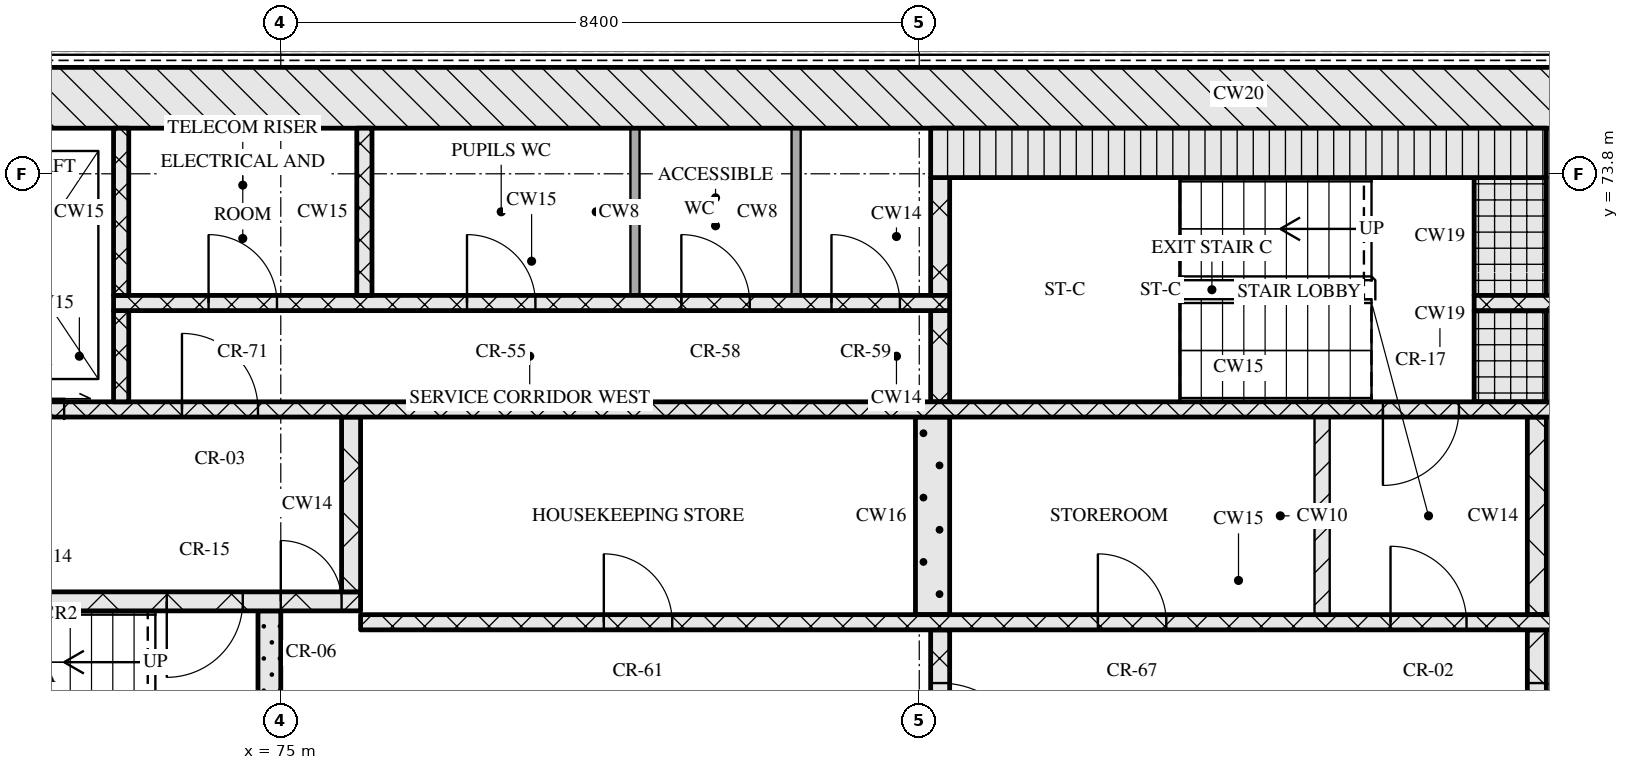
"""IFC4 building model, lengths in metres.
Left out: names, types, materials, properties, quantities, classifications, styles, units other than length and angle.
Written with IfcOpenShell. Run it as: python <this file> out.ifc"""

import sys

from ifc_helpers import new_model, si_unit, direction, frame, frame_2d, origin, place, context, subcontext, project, spatial, rectangle, extrude, element, fill, save


model = new_model("IFC4")
c1 = context("Model", 3, precision=1e-05, world=origin(), true_north=direction((0.0, 1.0)))
c2 = subcontext(c1, "Body", "Model", "MODEL_VIEW")
j1 = project(units=[si_unit("LENGTHUNIT", "METRE"), si_unit("PLANEANGLEUNIT", "RADIAN")], contexts=[c1])
p1 = place(None, origin())
s1 = spatial("IfcSite", under=j1, at=p1, CompositionType="ELEMENT")
p2 = place(p1, origin())
s2 = spatial("IfcBuilding", under=s1, at=p2, CompositionType="ELEMENT")
p3 = place(p2, frame((0.0, 0.0, 165.45)))
s3 = spatial("IfcBuildingStorey", under=s2, at=p3, CompositionType="ELEMENT", Elevation=165.45)
p4 = place(p3, frame((67.0, 74.8, 0.0), z_axis=(0.0, 0.0, 1.0), x_axis=(1.0, 0.0, 0.0)))
e1 = element("IfcWall", 1, at=p4, inside=s3, PredefinedType="SOLIDWALL", context=c2, shape_type="SweptSolid", body=[
    extrude(rectangle(XDim=41.2, YDim=0.8, at=frame_2d((20.6, 0.0))), origin(), (0.0, 0.0, 1.0), 3.32),
])
p5 = place(p3, frame((74.85, 65.2, 0.0), z_axis=(0.0, 0.0, 1.0), x_axis=(0.0, 1.0, 0.0)))
e2 = element("IfcWall", 2, at=p5, inside=s3, PredefinedType="SOLIDWALL", context=c2, shape_type="SweptSolid", body=[
    extrude(rectangle(XDim=2.85, YDim=0.3, at=frame_2d((1.425, 0.0))), origin(), (0.0, 0.0, 1.0), 3.32),
])
p6 = place(p3, frame((83.675, 65.2, 0.0), z_axis=(0.0, 0.0, 1.0), x_axis=(0.0, 1.0, 0.0)))
e3 = element("IfcWall", 3, at=p6, inside=s3, PredefinedType="SOLIDWALL", context=c2, shape_type="SweptSolid", body=[
    extrude(rectangle(XDim=2.6, YDim=0.25, at=frame_2d((1.3, 0.0))), origin(), (0.0, 0.0, 1.0), 3.32),
])
p7 = place(p6, frame((0.7, 0.0, 0.0)))
e4 = element("IfcOpeningElement", 4, at=p7, cuts=e3, PredefinedType="OPENING", context=c2, shape_type="SweptSolid", body=[
    extrude(rectangle(XDim=1.2, YDim=2.1, at=frame_2d((0.6, 1.05))), frame((0.0, 0.135, 0.0), z_axis=(0.0, -1.0, 0.0), x_axis=(1.0, 0.0, 0.0)), (0.0, 0.0, 1.0), 0.27),
])
p8 = place(p3, frame((91.525, 65.2, 0.0), z_axis=(0.0, 0.0, 1.0), x_axis=(0.0, 1.0, 0.0)))
e5 = element("IfcWall", 5, at=p8, inside=s3, PredefinedType="SOLIDWALL", context=c2, shape_type="SweptSolid", body=[
    extrude(rectangle(XDim=2.6, YDim=0.25, at=frame_2d((1.3, 0.0))), origin(), (0.0, 0.0, 1.0), 3.32),
])
p9 = place(p8, frame((0.7, 0.0, 0.0)))
e6 = element("IfcOpeningElement", 6, at=p9, cuts=e5, PredefinedType="OPENING", context=c2, shape_type="SweptSolid", body=[
    extrude(rectangle(XDim=1.2, YDim=2.1, at=frame_2d((0.6, 1.05))), frame((0.0, 0.135, 0.0), z_axis=(0.0, -1.0, 0.0), x_axis=(1.0, 0.0, 0.0)), (0.0, 0.0, 1.0), 0.27),
])
p10 = place(p3, frame((76.05, 67.9, 0.0), z_axis=(0.0, 0.0, 1.0), x_axis=(1.0, 0.0, 0.0)))
e7 = element("IfcWall", 7, at=p10, inside=s3, PredefinedType="SOLIDWALL", context=c2, shape_type="SweptSolid", body=[
    extrude(rectangle(XDim=23.1, YDim=0.2, at=frame_2d((11.55, 0.0))), origin(), (0.0, 0.0, 1.0), 3.32),
])
p11 = place(p10, frame((3.2, 0.0, 0.0)))
e8 = element("IfcOpeningElement", 8, at=p11, cuts=e7, PredefinedType="OPENING", context=c2, shape_type="SweptSolid", body=[
    extrude(rectangle(XDim=0.9, YDim=2.1, at=frame_2d((0.45, 1.05))), frame((0.0, 0.11, 0.0), z_axis=(0.0, -1.0, 0.0), x_axis=(1.0, 0.0, 0.0)), (0.0, 0.0, 1.0), 0.22),
])
p12 = place(p10, frame((9.7, 0.0, 0.0)))
e9 = element("IfcOpeningElement", 9, at=p12, cuts=e7, PredefinedType="OPENING", context=c2, shape_type="SweptSolid", body=[
    extrude(rectangle(XDim=0.9, YDim=2.1, at=frame_2d((0.45, 1.05))), frame((0.0, 0.11, 0.0), z_axis=(0.0, -1.0, 0.0), x_axis=(1.0, 0.0, 0.0)), (0.0, 0.0, 1.0), 0.22),
])
p13 = place(p10, frame((13.55, 0.0, 0.0)))
e10 = element("IfcOpeningElement", 10, at=p13, cuts=e7, PredefinedType="OPENING", context=c2, shape_type="SweptSolid", body=[
    extrude(rectangle(XDim=1.0, YDim=2.1, at=frame_2d((0.5, 1.05))), frame((0.0, 0.11, 0.0), z_axis=(0.0, -1.0, 0.0), x_axis=(1.0, 0.0, 0.0)), (0.0, 0.0, 1.0), 0.22),
])
p14 = place(p10, frame((16.2, 0.0, 0.0)))
e11 = element("IfcOpeningElement", 11, at=p14, cuts=e7, PredefinedType="OPENING", context=c2, shape_type="SweptSolid", body=[
    extrude(rectangle(XDim=1.1, YDim=2.1, at=frame_2d((0.55, 1.05))), frame((0.0, 0.11, 0.0), z_axis=(0.0, -1.0, 0.0), x_axis=(1.0, 0.0, 0.0)), (0.0, 0.0, 1.0), 0.22),
])
p15 = place(p10, frame((18.7, 0.0, 0.0)))
e12 = element("IfcOpeningElement", 12, at=p15, cuts=e7, PredefinedType="OPENING", context=c2, shape_type="SweptSolid", body=[
    extrude(rectangle(XDim=1.1, YDim=2.1, at=frame_2d((0.55, 1.05))), frame((0.0, 0.11, 0.0), z_axis=(0.0, -1.0, 0.0), x_axis=(1.0, 0.0, 0.0)), (0.0, 0.0, 1.0), 0.22),
])
p16 = place(p10, frame((21.2, 0.0, 0.0)))
e13 = element("IfcOpeningElement", 13, at=p16, cuts=e7, PredefinedType="OPENING", context=c2, shape_type="SweptSolid", body=[
    extrude(rectangle(XDim=1.1, YDim=2.1, at=frame_2d((0.55, 1.05))), frame((0.0, 0.11, 0.0), z_axis=(0.0, -1.0, 0.0), x_axis=(1.0, 0.0, 0.0)), (0.0, 0.0, 1.0), 0.22),
])
p17 = place(p3, frame((83.575, 68.0, 0.0), z_axis=(0.0, 0.0, 1.0), x_axis=(0.0, 1.0, 0.0)))
e14 = element("IfcWall", 14, at=p17, inside=s3, PredefinedType="SOLIDWALL", context=c2, shape_type="SweptSolid", body=[
    extrude(rectangle(XDim=2.6, YDim=0.45, at=frame_2d((1.3, 0.0))), origin(), (0.0, 0.0, 1.0), 3.32),
])
p18 = place(p3, frame((88.7, 68.0, 0.0), z_axis=(0.0, 0.0, 1.0), x_axis=(0.0, 1.0, 0.0)))
e15 = element("IfcWall", 15, at=p18, inside=s3, PredefinedType="PARTITIONING", context=c2, shape_type="SweptSolid", body=[
    extrude(rectangle(XDim=2.6, YDim=0.2, at=frame_2d((1.3, 0.0))), origin(), (0.0, 0.0, 1.0), 3.32),
])
p19 = place(p3, frame((91.525, 68.0, 0.0), z_axis=(0.0, 0.0, 1.0), x_axis=(0.0, 1.0, 0.0)))
e16 = element("IfcWall", 16, at=p19, inside=s3, PredefinedType="SOLIDWALL", context=c2, shape_type="SweptSolid", body=[
    extrude(rectangle(XDim=2.6, YDim=0.25, at=frame_2d((1.3, 0.0))), origin(), (0.0, 0.0, 1.0), 3.32),
])
p20 = place(p3, frame((67.8, 68.175, 0.0), z_axis=(0.0, 0.0, 1.0), x_axis=(1.0, 0.0, 0.0)))
e17 = element("IfcWall", 17, at=p20, inside=s3, PredefinedType="SOLIDWALL", context=c2, shape_type="SweptSolid", body=[
    extrude(rectangle(XDim=8.25, YDim=0.25, at=frame_2d((4.125, 0.0))), origin(), (0.0, 0.0, 1.0), 3.32),
])
p21 = place(p20, frame((5.7, 0.0, 0.0)))
e18 = element("IfcOpeningElement", 18, at=p21, cuts=e17, PredefinedType="OPENING", context=c2, shape_type="SweptSolid", body=[
    extrude(rectangle(XDim=1.0, YDim=2.1, at=frame_2d((0.5, 1.05))), frame((0.0, 0.135, 0.0), z_axis=(0.0, -1.0, 0.0), x_axis=(1.0, 0.0, 0.0)), (0.0, 0.0, 1.0), 0.27),
])
p22 = place(p20, frame((7.2, 0.0, 0.0)))
e19 = element("IfcOpeningElement", 19, at=p22, cuts=e17, PredefinedType="OPENING", context=c2, shape_type="SweptSolid", body=[
    extrude(rectangle(XDim=0.8, YDim=2.1, at=frame_2d((0.4, 1.05))), frame((0.0, 0.135, 0.0), z_axis=(0.0, -1.0, 0.0), x_axis=(1.0, 0.0, 0.0)), (0.0, 0.0, 1.0), 0.27),
])
p23 = place(p3, frame((75.925, 68.3, 0.0), z_axis=(0.0, 0.0, 1.0), x_axis=(0.0, 1.0, 0.0)))
e20 = element("IfcWall", 20, at=p23, inside=s3, PredefinedType="SOLIDWALL", context=c2, shape_type="SweptSolid", body=[
    extrude(rectangle(XDim=2.3, YDim=0.25, at=frame_2d((1.15, 0.0))), origin(), (0.0, 0.0, 1.0), 3.32),
])
p24 = place(p3, frame((67.8, 70.7, 0.0), z_axis=(0.0, 0.0, 1.0), x_axis=(1.0, 0.0, 0.0)))
e21 = element("IfcWall", 21, at=p24, inside=s3, PredefinedType="SOLIDWALL", context=c2, shape_type="SweptSolid", body=[
    extrude(rectangle(XDim=39.6, YDim=0.2, at=frame_2d((19.8, 0.0))), origin(), (0.0, 0.0, 1.0), 3.32),
])
p25 = place(p24, frame((0.65, 0.0, 0.0)))
e22 = element("IfcOpeningElement", 22, at=p25, cuts=e21, PredefinedType="OPENING", context=c2, shape_type="SweptSolid", body=[
    extrude(rectangle(XDim=1.1, YDim=2.1, at=frame_2d((0.55, 1.05))), frame((0.0, 0.11, 0.0), z_axis=(0.0, -1.0, 0.0), x_axis=(1.0, 0.0, 0.0)), (0.0, 0.0, 1.0), 0.22),
])
p26 = place(p24, frame((3.25, 0.0, 0.0)))
e23 = element("IfcOpeningElement", 23, at=p26, cuts=e21, PredefinedType="OPENING", context=c2, shape_type="SweptSolid", body=[
    extrude(rectangle(XDim=1.1, YDim=2.1, at=frame_2d((0.55, 1.05))), frame((0.0, 0.11, 0.0), z_axis=(0.0, -1.0, 0.0), x_axis=(1.0, 0.0, 0.0)), (0.0, 0.0, 1.0), 0.22),
])
p27 = place(p24, frame((5.9, 0.0, 0.0)))
e24 = element("IfcOpeningElement", 24, at=p27, cuts=e21, PredefinedType="OPENING", context=c2, shape_type="SweptSolid", body=[
    extrude(rectangle(XDim=1.0, YDim=2.1, at=frame_2d((0.5, 1.05))), frame((0.0, 0.11, 0.0), z_axis=(0.0, -1.0, 0.0), x_axis=(1.0, 0.0, 0.0)), (0.0, 0.0, 1.0), 0.22),
])
p28 = place(p24, frame((21.7, 0.0, 0.0)))
e25 = element("IfcOpeningElement", 25, at=p28, cuts=e21, PredefinedType="OPENING", context=c2, shape_type="SweptSolid", body=[
    extrude(rectangle(XDim=1.0, YDim=2.1, at=frame_2d((0.5, 1.05))), frame((0.0, 0.11, 0.0), z_axis=(0.0, -1.0, 0.0), x_axis=(1.0, 0.0, 0.0)), (0.0, 0.0, 1.0), 0.22),
])
p29 = place(p24, frame((32.7, 0.0, 0.0)))
e26 = element("IfcOpeningElement", 26, at=p29, cuts=e21, PredefinedType="OPENING", context=c2, shape_type="SweptSolid", body=[
    extrude(rectangle(XDim=1.0, YDim=2.1, at=frame_2d((0.5, 1.05))), frame((0.0, 0.11, 0.0), z_axis=(0.0, -1.0, 0.0), x_axis=(1.0, 0.0, 0.0)), (0.0, 0.0, 1.0), 0.22),
])
p30 = place(p24, frame((35.25, 0.0, 0.0)))
e27 = element("IfcOpeningElement", 27, at=p30, cuts=e21, PredefinedType="OPENING", context=c2, shape_type="SweptSolid", body=[
    extrude(rectangle(XDim=1.1, YDim=2.1, at=frame_2d((0.55, 1.05))), frame((0.0, 0.11, 0.0), z_axis=(0.0, -1.0, 0.0), x_axis=(1.0, 0.0, 0.0)), (0.0, 0.0, 1.0), 0.22),
])
p31 = place(p24, frame((37.85, 0.0, 0.0)))
e28 = element("IfcOpeningElement", 28, at=p31, cuts=e21, PredefinedType="OPENING", context=c2, shape_type="SweptSolid", body=[
    extrude(rectangle(XDim=1.1, YDim=2.1, at=frame_2d((0.55, 1.05))), frame((0.0, 0.11, 0.0), z_axis=(0.0, -1.0, 0.0), x_axis=(1.0, 0.0, 0.0)), (0.0, 0.0, 1.0), 0.22),
])
p32 = place(p3, frame((72.9, 70.8, 0.0), z_axis=(0.0, 0.0, 1.0), x_axis=(0.0, 1.0, 0.0)))
e29 = element("IfcWall", 29, at=p32, inside=s3, PredefinedType="SOLIDWALL", context=c2, shape_type="SweptSolid", body=[
    extrude(rectangle(XDim=1.2, YDim=0.2, at=frame_2d((0.6, 0.0))), origin(), (0.0, 0.0, 1.0), 3.32),
])
p33 = place(p3, frame((83.675, 70.8, 0.0), z_axis=(0.0, 0.0, 1.0), x_axis=(0.0, 1.0, 0.0)))
e30 = element("IfcWall", 30, at=p33, inside=s3, PredefinedType="SOLIDWALL", context=c2, shape_type="SweptSolid", body=[
    extrude(rectangle(XDim=1.2, YDim=0.25, at=frame_2d((0.6, 0.0))), origin(), (0.0, 0.0, 1.0), 3.32),
])
p34 = place(p3, frame((91.175, 70.8, 0.0), z_axis=(0.0, 0.0, 1.0), x_axis=(0.0, 1.0, 0.0)))
e31 = element("IfcWall", 31, at=p34, inside=s3, PredefinedType="SOLIDWALL", context=c2, shape_type="SweptSolid", body=[
    extrude(rectangle(XDim=1.2, YDim=0.95, at=frame_2d((0.6, 0.0))), origin(), (0.0, 0.0, 1.0), 3.32),
])
p35 = place(p3, frame((72.8, 72.1, 0.0), z_axis=(0.0, 0.0, 1.0), x_axis=(1.0, 0.0, 0.0)))
e32 = element("IfcWall", 32, at=p35, inside=s3, PredefinedType="SOLIDWALL", context=c2, shape_type="SweptSolid", body=[
    extrude(rectangle(XDim=11.0, YDim=0.2, at=frame_2d((5.5, 0.0))), origin(), (0.0, 0.0, 1.0), 3.32),
])
p36 = place(p35, frame((1.25, 0.0, 0.0)))
e33 = element("IfcOpeningElement", 33, at=p36, cuts=e32, PredefinedType="OPENING", context=c2, shape_type="SweptSolid", body=[
    extrude(rectangle(XDim=0.9, YDim=2.1, at=frame_2d((0.45, 1.05))), frame((0.0, 0.11, 0.0), z_axis=(0.0, -1.0, 0.0), x_axis=(1.0, 0.0, 0.0)), (0.0, 0.0, 1.0), 0.22),
])
p37 = place(p35, frame((4.65, 0.0, 0.0)))
e34 = element("IfcOpeningElement", 34, at=p37, cuts=e32, PredefinedType="OPENING", context=c2, shape_type="SweptSolid", body=[
    extrude(rectangle(XDim=0.9, YDim=2.1, at=frame_2d((0.45, 1.05))), frame((0.0, 0.11, 0.0), z_axis=(0.0, -1.0, 0.0), x_axis=(1.0, 0.0, 0.0)), (0.0, 0.0, 1.0), 0.22),
])
p38 = place(p35, frame((7.47, 0.0, 0.0)))
e35 = element("IfcOpeningElement", 35, at=p38, cuts=e32, PredefinedType="OPENING", context=c2, shape_type="SweptSolid", body=[
    extrude(rectangle(XDim=0.9, YDim=2.1, at=frame_2d((0.45, 1.05))), frame((0.0, 0.11, 0.0), z_axis=(0.0, -1.0, 0.0), x_axis=(1.0, 0.0, 0.0)), (0.0, 0.0, 1.0), 0.22),
])
p39 = place(p35, frame((9.445, 0.0, 0.0)))
e36 = element("IfcOpeningElement", 36, at=p39, cuts=e32, PredefinedType="OPENING", context=c2, shape_type="SweptSolid", body=[
    extrude(rectangle(XDim=0.9, YDim=2.1, at=frame_2d((0.45, 1.05))), frame((0.0, 0.11, 0.0), z_axis=(0.0, -1.0, 0.0), x_axis=(1.0, 0.0, 0.0)), (0.0, 0.0, 1.0), 0.22),
])
p40 = place(p3, frame((90.7, 72.1, 0.0), z_axis=(0.0, 0.0, 1.0), x_axis=(1.0, 0.0, 0.0)))
e37 = element("IfcWall", 37, at=p40, inside=s3, PredefinedType="SOLIDWALL", context=c2, shape_type="SweptSolid", body=[
    extrude(rectangle(XDim=11.7, YDim=0.2, at=frame_2d((5.85, 0.0))), origin(), (0.0, 0.0, 1.0), 3.32),
])
p41 = place(p40, frame((1.6, 0.0, 0.0)))
e38 = element("IfcOpeningElement", 38, at=p41, cuts=e37, PredefinedType="OPENING", context=c2, shape_type="SweptSolid", body=[
    extrude(rectangle(XDim=0.9, YDim=2.1, at=frame_2d((0.45, 1.05))), frame((0.0, 0.11, 0.0), z_axis=(0.0, -1.0, 0.0), x_axis=(1.0, 0.0, 0.0)), (0.0, 0.0, 1.0), 0.22),
])
p42 = place(p40, frame((5.335, 0.0, 0.0)))
e39 = element("IfcOpeningElement", 39, at=p42, cuts=e37, PredefinedType="OPENING", context=c2, shape_type="SweptSolid", body=[
    extrude(rectangle(XDim=0.9, YDim=2.1, at=frame_2d((0.45, 1.05))), frame((0.0, 0.11, 0.0), z_axis=(0.0, -1.0, 0.0), x_axis=(1.0, 0.0, 0.0)), (0.0, 0.0, 1.0), 0.22),
])
p43 = place(p40, frame((9.55, 0.0, 0.0)))
e40 = element("IfcOpeningElement", 40, at=p43, cuts=e37, PredefinedType="OPENING", context=c2, shape_type="SweptSolid", body=[
    extrude(rectangle(XDim=0.9, YDim=2.1, at=frame_2d((0.45, 1.05))), frame((0.0, 0.11, 0.0), z_axis=(0.0, -1.0, 0.0), x_axis=(1.0, 0.0, 0.0)), (0.0, 0.0, 1.0), 0.22),
])
for number, where, z_axis, x_axis in (
    (41, (72.9, 72.2, 0.0), (0.0, 0.0, 1.0), (0.0, 1.0, 0.0)),
    (42, (76.1, 72.2, 0.0), (0.0, 0.0, 1.0), (0.0, 1.0, 0.0)),
):
    element("IfcWall", number, at=place(p3, frame(where, z_axis=z_axis, x_axis=x_axis)), inside=s3, PredefinedType="SOLIDWALL", context=c2, shape_type="SweptSolid", body=[
        extrude(rectangle(XDim=2.2, YDim=0.2, at=frame_2d((1.1, 0.0))), origin(), (0.0, 0.0, 1.0), 3.32),
    ])
for number, where, z_axis, x_axis in (
    (43, (79.66, 72.2, 0.0), (0.0, 0.0, 1.0), (0.0, 1.0, 0.0)),
    (44, (81.78, 72.2, 0.0), (0.0, 0.0, 1.0), (0.0, 1.0, 0.0)),
):
    element("IfcWall", number, at=place(p3, frame(where, z_axis=z_axis, x_axis=x_axis)), inside=s3, PredefinedType="PARTITIONING", context=c2, shape_type="SweptSolid", body=[
        extrude(rectangle(XDim=2.2, YDim=0.12, at=frame_2d((1.1, 0.0))), origin(), (0.0, 0.0, 1.0), 3.32),
    ])
p44 = place(p3, frame((83.675, 72.2, 0.0), z_axis=(0.0, 0.0, 1.0), x_axis=(0.0, 1.0, 0.0)))
e45 = element("IfcWall", 45, at=p44, inside=s3, PredefinedType="SOLIDWALL", context=c2, shape_type="SweptSolid", body=[
    extrude(rectangle(XDim=1.55, YDim=0.25, at=frame_2d((0.775, 0.0))), origin(), (0.0, 0.0, 1.0), 3.32),
])
p45 = place(p3, frame((91.175, 72.2, 0.0), z_axis=(0.0, 0.0, 1.0), x_axis=(0.0, 1.0, 0.0)))
e46 = element("IfcWall", 46, at=p45, inside=s3, PredefinedType="SOLIDWALL", context=c2, shape_type="SweptSolid", body=[
    extrude(rectangle(XDim=1.55, YDim=0.95, at=frame_2d((0.775, 0.0))), origin(), (0.0, 0.0, 1.0), 3.32),
])
p46 = place(p3, frame((83.55, 74.075, 0.0), z_axis=(0.0, 0.0, 1.0), x_axis=(1.0, 0.0, 0.0)))
e47 = element("IfcWall", 47, at=p46, inside=s3, PredefinedType="SOLIDWALL", context=c2, shape_type="SweptSolid", body=[
    extrude(rectangle(XDim=8.1, YDim=0.65, at=frame_2d((4.05, 0.0))), origin(), (0.0, 0.0, 1.0), 3.32),
])
p47 = place(p7, origin())
e48 = element("IfcDoor", 48, at=p47, inside=s3, OperationType="SINGLE_SWING_RIGHT", PredefinedType="DOOR", context=c2, shape_type="SweptSolid", body=[
    extrude(rectangle(XDim=1.2, YDim=2.1, at=frame_2d((0.6, 1.05))), frame((0.0, 0.025, 0.0), z_axis=(0.0, -1.0, 0.0), x_axis=(1.0, 0.0, 0.0)), (0.0, 0.0, 1.0), 0.05),
])
fill(e4, e48)
p48 = place(p9, origin())
e49 = element("IfcDoor", 49, at=p48, inside=s3, OperationType="SINGLE_SWING_RIGHT", PredefinedType="DOOR", context=c2, shape_type="SweptSolid", body=[
    extrude(rectangle(XDim=1.2, YDim=2.1, at=frame_2d((0.6, 1.05))), frame((0.0, 0.025, 0.0), z_axis=(0.0, -1.0, 0.0), x_axis=(1.0, 0.0, 0.0)), (0.0, 0.0, 1.0), 0.05),
])
fill(e6, e49)
p49 = place(p11, origin())
e50 = element("IfcDoor", 50, at=p49, inside=s3, OperationType="SINGLE_SWING_LEFT", PredefinedType="DOOR", context=c2, shape_type="SweptSolid", body=[
    extrude(rectangle(XDim=0.9, YDim=2.1, at=frame_2d((0.45, 1.05))), frame((0.0, 0.025, 0.0), z_axis=(0.0, -1.0, 0.0), x_axis=(1.0, 0.0, 0.0)), (0.0, 0.0, 1.0), 0.05),
])
fill(e8, e50)
p50 = place(p12, origin())
e51 = element("IfcDoor", 51, at=p50, inside=s3, OperationType="SINGLE_SWING_LEFT", PredefinedType="DOOR", context=c2, shape_type="SweptSolid", body=[
    extrude(rectangle(XDim=0.9, YDim=2.1, at=frame_2d((0.45, 1.05))), frame((0.0, 0.025, 0.0), z_axis=(0.0, -1.0, 0.0), x_axis=(1.0, 0.0, 0.0)), (0.0, 0.0, 1.0), 0.05),
])
fill(e9, e51)
p51 = place(p13, origin())
e52 = element("IfcDoor", 52, at=p51, inside=s3, OperationType="SINGLE_SWING_LEFT", PredefinedType="DOOR", context=c2, shape_type="SweptSolid", body=[
    extrude(rectangle(XDim=1.0, YDim=2.1, at=frame_2d((0.5, 1.05))), frame((0.0, 0.025, 0.0), z_axis=(0.0, -1.0, 0.0), x_axis=(1.0, 0.0, 0.0)), (0.0, 0.0, 1.0), 0.05),
])
fill(e10, e52)
p52 = place(p21, origin())
e53 = element("IfcDoor", 53, at=p52, inside=s3, OperationType="SINGLE_SWING_RIGHT", PredefinedType="DOOR", context=c2, shape_type="SweptSolid", body=[
    extrude(rectangle(XDim=1.0, YDim=2.1, at=frame_2d((0.5, 1.05))), frame((0.0, 0.025, 0.0), z_axis=(0.0, -1.0, 0.0), x_axis=(1.0, 0.0, 0.0)), (0.0, 0.0, 1.0), 0.05),
])
fill(e18, e53)
p53 = place(p22, origin())
e54 = element("IfcDoor", 54, at=p53, inside=s3, OperationType="SINGLE_SWING_LEFT", PredefinedType="DOOR", context=c2, shape_type="SweptSolid", body=[
    extrude(rectangle(XDim=0.8, YDim=2.1, at=frame_2d((0.4, 1.05))), frame((0.0, 0.025, 0.0), z_axis=(0.0, -1.0, 0.0), x_axis=(1.0, 0.0, 0.0)), (0.0, 0.0, 1.0), 0.05),
])
fill(e19, e54)
p54 = place(p26, origin())
e55 = element("IfcDoor", 55, at=p54, inside=s3, OperationType="SLIDING_TO_RIGHT", PredefinedType="DOOR", context=c2, shape_type="SweptSolid", body=[
    extrude(rectangle(XDim=1.1, YDim=2.1, at=frame_2d((0.55, 1.05))), frame((0.0, 0.025, 0.0), z_axis=(0.0, -1.0, 0.0), x_axis=(1.0, 0.0, 0.0)), (0.0, 0.0, 1.0), 0.05),
])
fill(e23, e55)
p55 = place(p27, origin())
e56 = element("IfcDoor", 56, at=p55, inside=s3, OperationType="SINGLE_SWING_LEFT", PredefinedType="DOOR", context=c2, shape_type="SweptSolid", body=[
    extrude(rectangle(XDim=1.0, YDim=2.1, at=frame_2d((0.5, 1.05))), frame((0.0, 0.025, 0.0), z_axis=(0.0, -1.0, 0.0), x_axis=(1.0, 0.0, 0.0)), (0.0, 0.0, 1.0), 0.05),
])
fill(e24, e56)
p56 = place(p28, origin())
e57 = element("IfcDoor", 57, at=p56, inside=s3, OperationType="SINGLE_SWING_RIGHT", PredefinedType="DOOR", context=c2, shape_type="SweptSolid", body=[
    extrude(rectangle(XDim=1.0, YDim=2.1, at=frame_2d((0.5, 1.05))), frame((0.0, 0.025, 0.0), z_axis=(0.0, -1.0, 0.0), x_axis=(1.0, 0.0, 0.0)), (0.0, 0.0, 1.0), 0.05),
])
fill(e25, e57)
p57 = place(p36, origin())
e58 = element("IfcDoor", 58, at=p57, inside=s3, OperationType="SINGLE_SWING_LEFT", PredefinedType="DOOR", context=c2, shape_type="SweptSolid", body=[
    extrude(rectangle(XDim=0.9, YDim=2.1, at=frame_2d((0.45, 1.05))), frame((0.0, 0.025, 0.0), z_axis=(0.0, -1.0, 0.0), x_axis=(1.0, 0.0, 0.0)), (0.0, 0.0, 1.0), 0.05),
])
fill(e33, e58)
p58 = place(p37, origin())
e59 = element("IfcDoor", 59, at=p58, inside=s3, OperationType="SINGLE_SWING_LEFT", PredefinedType="DOOR", context=c2, shape_type="SweptSolid", body=[
    extrude(rectangle(XDim=0.9, YDim=2.1, at=frame_2d((0.45, 1.05))), frame((0.0, 0.025, 0.0), z_axis=(0.0, -1.0, 0.0), x_axis=(1.0, 0.0, 0.0)), (0.0, 0.0, 1.0), 0.05),
])
fill(e34, e59)
p59 = place(p38, origin())
e60 = element("IfcDoor", 60, at=p59, inside=s3, OperationType="SINGLE_SWING_LEFT", PredefinedType="DOOR", context=c2, shape_type="SweptSolid", body=[
    extrude(rectangle(XDim=0.9, YDim=2.1, at=frame_2d((0.45, 1.05))), frame((0.0, 0.025, 0.0), z_axis=(0.0, -1.0, 0.0), x_axis=(1.0, 0.0, 0.0)), (0.0, 0.0, 1.0), 0.05),
])
fill(e35, e60)
p60 = place(p39, origin())
e61 = element("IfcDoor", 61, at=p60, inside=s3, OperationType="SINGLE_SWING_LEFT", PredefinedType="DOOR", context=c2, shape_type="SweptSolid", body=[
    extrude(rectangle(XDim=0.9, YDim=2.1, at=frame_2d((0.45, 1.05))), frame((0.0, 0.025, 0.0), z_axis=(0.0, -1.0, 0.0), x_axis=(1.0, 0.0, 0.0)), (0.0, 0.0, 1.0), 0.05),
])
fill(e36, e61)
save(model, sys.argv[1])
